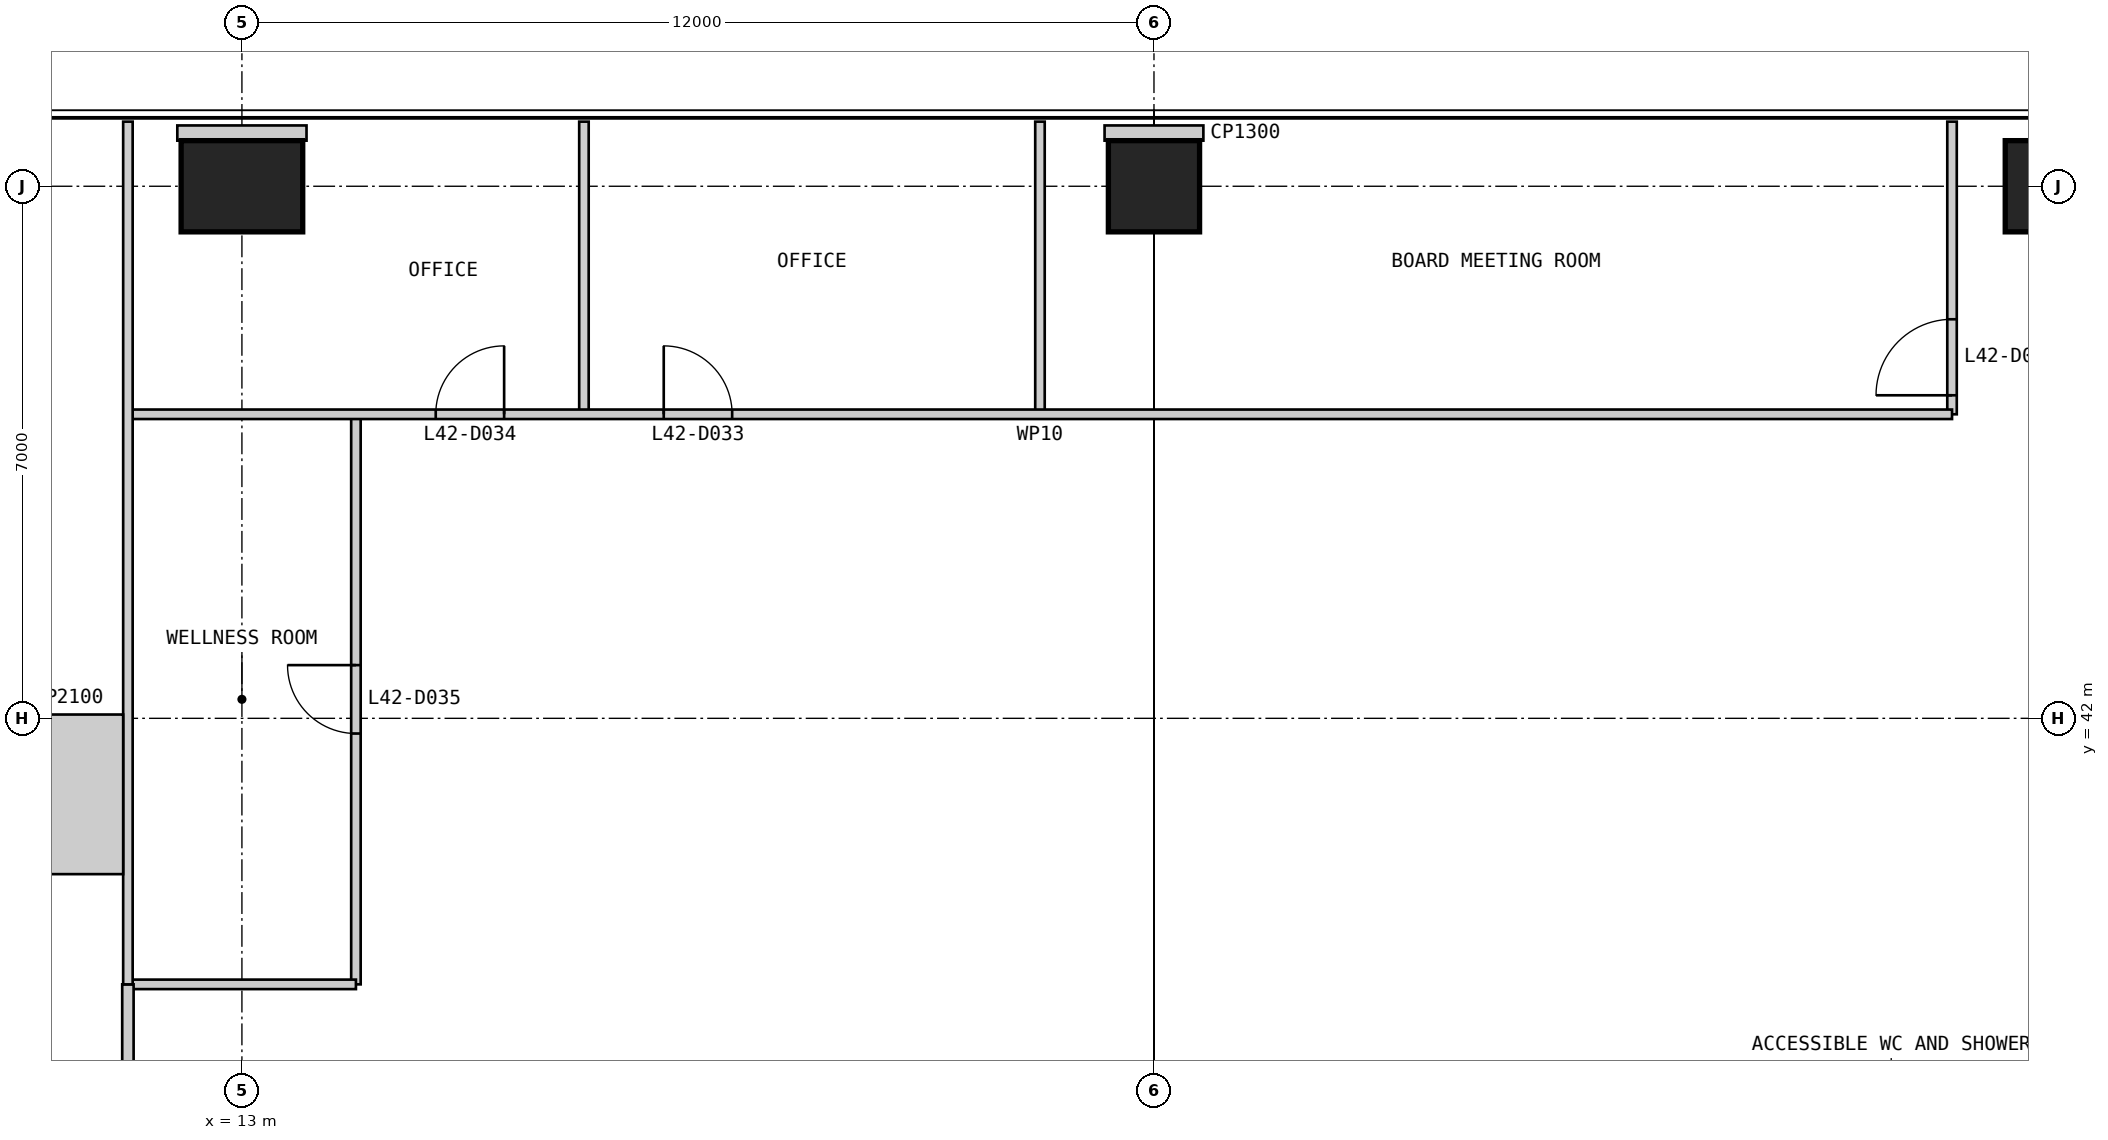
"""IFC4 building model, lengths in metres.
Left out: names, types, materials, properties, quantities, classifications, styles, units other than length and angle.
Written with IfcOpenShell. Run it as: python <this file> out.ifc"""

import sys

from ifc_helpers import new_model, si_unit, direction, frame, frame_2d, origin, origin_2d, place, context, subcontext, project, spatial, rectangle, extrude, element, fill, save


model = new_model("IFC4")
c1 = context("Model", 3, precision=1e-05, world=origin(), true_north=direction((0.0, 1.0)))
c2 = subcontext(c1, "Body", "Model", "MODEL_VIEW")
j1 = project(units=[si_unit("LENGTHUNIT", "METRE"), si_unit("PLANEANGLEUNIT", "RADIAN")], contexts=[c1])
p1 = place(None, origin())
s1 = spatial("IfcSite", under=j1, at=p1, CompositionType="ELEMENT")
p2 = place(p1, origin())
s2 = spatial("IfcBuilding", under=s1, at=p2, CompositionType="ELEMENT")
p3 = place(p2, frame((0.0, 0.0, 181.8)))
s3 = spatial("IfcBuildingStorey", under=s2, at=p3, CompositionType="ELEMENT", Elevation=181.8)
p4 = place(p3, frame((37.0, 49.0, 0.0), z_axis=(0.0, 0.0, 1.0), x_axis=(1.0, 0.0, 0.0)))
e1 = element("IfcColumn", 1, at=p4, inside=s3, PredefinedType="COLUMN", context=c2, shape_type="SweptSolid", body=[
    extrude(rectangle(XDim=1.6, YDim=1.2, at=origin_2d()), origin(), (0.0, 0.0, 1.0), 4.0),
])
p5 = place(p3, frame((25.0, 49.0, 0.0), z_axis=(0.0, 0.0, 1.0), x_axis=(1.0, 0.0, 0.0)))
e2 = element("IfcColumn", 2, at=p5, inside=s3, PredefinedType="COLUMN", context=c2, shape_type="SweptSolid", body=[
    extrude(rectangle(XDim=1.2, YDim=1.2, at=origin_2d()), origin(), (0.0, 0.0, 1.0), 4.0),
])
p6 = place(p3, frame((13.0, 49.0, 0.0), z_axis=(0.0, 0.0, 1.0), x_axis=(1.0, 0.0, 0.0)))
e3 = element("IfcColumn", 3, at=p6, inside=s3, PredefinedType="COLUMN", context=c2, shape_type="SweptSolid", body=[
    extrude(rectangle(XDim=1.6, YDim=1.2, at=origin_2d()), origin(), (0.0, 0.0, 1.0), 4.0),
])
p7 = place(p3, frame((35.5, 49.85, 0.0), z_axis=(0.0, 0.0, 1.0), x_axis=(0.0, -1.0, 0.0)))
e4 = element("IfcWall", 4, at=p7, inside=s3, PredefinedType="PARTITIONING", context=c2, shape_type="SweptSolid", body=[
    extrude(rectangle(XDim=3.85, YDim=0.125, at=frame_2d((1.925, 0.0))), origin(), (0.0, 0.0, 1.0), 3.85),
])
p8 = place(p7, frame((2.6, 0.0, 0.0)))
e5 = element("IfcOpeningElement", 5, at=p8, cuts=e4, PredefinedType="OPENING", context=c2, shape_type="SweptSolid", body=[
    extrude(rectangle(XDim=1.0, YDim=2.2, at=frame_2d((0.5, 1.1))), frame((0.0, 0.073, 0.0), z_axis=(0.0, -1.0, 0.0), x_axis=(1.0, 0.0, 0.0)), (0.0, 0.0, 1.0), 0.145),
])
for number, where, z_axis, x_axis in (
    (6, (23.5, 49.85, 0.0), (0.0, 0.0, 1.0), (0.0, -1.0, 0.0)),
    (7, (17.5, 49.85, 0.0), (0.0, 0.0, 1.0), (0.0, -1.0, 0.0)),
):
    element("IfcWall", number, at=place(p3, frame(where, z_axis=z_axis, x_axis=x_axis)), inside=s3, PredefinedType="PARTITIONING", context=c2, shape_type="SweptSolid", body=[
        extrude(rectangle(XDim=3.85, YDim=0.125, at=frame_2d((1.925, 0.0))), origin(), (0.0, 0.0, 1.0), 3.85),
    ])
p9 = place(p3, frame((14.5, 46.0, 0.0), z_axis=(0.0, 0.0, 1.0), x_axis=(0.0, -1.0, 0.0)))
e8 = element("IfcWall", 8, at=p9, inside=s3, PredefinedType="PARTITIONING", context=c2, shape_type="SweptSolid", body=[
    extrude(rectangle(XDim=7.5, YDim=0.125, at=frame_2d((3.75, 0.0))), origin(), (0.0, 0.0, 1.0), 3.85),
])
p10 = place(p9, frame((3.3, 0.0, 0.0)))
e9 = element("IfcOpeningElement", 9, at=p10, cuts=e8, PredefinedType="OPENING", context=c2, shape_type="SweptSolid", body=[
    extrude(rectangle(XDim=0.9, YDim=2.2, at=frame_2d((0.45, 1.1))), frame((0.0, 0.073, 0.0), z_axis=(0.0, -1.0, 0.0), x_axis=(1.0, 0.0, 0.0)), (0.0, 0.0, 1.0), 0.145),
])
p11 = place(p3, frame((35.5, 46.0, 0.0), z_axis=(0.0, 0.0, 1.0), x_axis=(-1.0, 0.0, 0.0)))
e10 = element("IfcWall", 10, at=p11, inside=s3, PredefinedType="PARTITIONING", context=c2, shape_type="SweptSolid", body=[
    extrude(rectangle(XDim=24.0, YDim=0.125, at=frame_2d((12.0, 0.0))), origin(), (0.0, 0.0, 1.0), 3.85),
])
p12 = place(p11, frame((16.05, 0.0, 0.0)))
e11 = element("IfcOpeningElement", 11, at=p12, cuts=e10, PredefinedType="OPENING", context=c2, shape_type="SweptSolid", body=[
    extrude(rectangle(XDim=0.9, YDim=2.2, at=frame_2d((0.45, 1.1))), frame((0.0, 0.073, 0.0), z_axis=(0.0, -1.0, 0.0), x_axis=(1.0, 0.0, 0.0)), (0.0, 0.0, 1.0), 0.145),
])
p13 = place(p11, frame((19.05, 0.0, 0.0)))
e12 = element("IfcOpeningElement", 12, at=p13, cuts=e10, PredefinedType="OPENING", context=c2, shape_type="SweptSolid", body=[
    extrude(rectangle(XDim=0.9, YDim=2.2, at=frame_2d((0.45, 1.1))), frame((0.0, 0.073, 0.0), z_axis=(0.0, -1.0, 0.0), x_axis=(1.0, 0.0, 0.0)), (0.0, 0.0, 1.0), 0.145),
])
p14 = place(p3, frame((14.5, 38.5, 0.0), z_axis=(0.0, 0.0, 1.0), x_axis=(-1.0, 0.0, 0.0)))
e13 = element("IfcWall", 13, at=p14, inside=s3, PredefinedType="PARTITIONING", context=c2, shape_type="SweptSolid", body=[
    extrude(rectangle(XDim=3.0, YDim=0.125, at=frame_2d((1.5, 0.0))), origin(), (0.0, 0.0, 1.0), 3.85),
])
p15 = place(p3, frame((11.5, 38.5, 0.0), z_axis=(0.0, 0.0, 1.0), x_axis=(0.0, -1.0, 0.0)))
e14 = element("IfcWall", 14, at=p15, inside=s3, PredefinedType="PARTITIONING", context=c2, shape_type="SweptSolid", body=[
    extrude(rectangle(XDim=27.0, YDim=0.15, at=frame_2d((13.5, 0.0))), origin(), (0.0, 0.0, 1.0), 3.85),
])
p16 = place(p15, frame((13.0, 0.0, 0.0)))
e15 = element("IfcOpeningElement", 15, at=p16, cuts=e14, PredefinedType="OPENING", context=c2, shape_type="SweptSolid", body=[
    extrude(rectangle(XDim=1.0, YDim=2.2, at=frame_2d((0.5, 1.1))), frame((0.0, 0.085, 0.0), z_axis=(0.0, -1.0, 0.0), x_axis=(1.0, 0.0, 0.0)), (0.0, 0.0, 1.0), 0.17),
])
p17 = place(p3, frame((11.5, 49.85, 0.0), z_axis=(0.0, 0.0, 1.0), x_axis=(0.0, -1.0, 0.0)))
e16 = element("IfcWall", 16, at=p17, inside=s3, PredefinedType="PARTITIONING", context=c2, shape_type="SweptSolid", body=[
    extrude(rectangle(XDim=11.35, YDim=0.125, at=frame_2d((5.675, 0.0))), origin(), (0.0, 0.0, 1.0), 3.85),
])
p18 = place(p3, frame((25.0, 49.8, 0.0), z_axis=(0.0, 0.0, 1.0), x_axis=(0.0, -1.0, 0.0)))
e17 = element("IfcWall", 17, at=p18, inside=s3, PredefinedType="PARTITIONING", context=c2, shape_type="SweptSolid", body=[
    extrude(rectangle(XDim=0.2, YDim=1.3, at=frame_2d((0.1, 0.0))), origin(), (0.0, 0.0, 1.0), 3.85),
])
p19 = place(p3, frame((13.0, 49.8, 0.0), z_axis=(0.0, 0.0, 1.0), x_axis=(0.0, -1.0, 0.0)))
e18 = element("IfcWall", 18, at=p19, inside=s3, PredefinedType="PARTITIONING", context=c2, shape_type="SweptSolid", body=[
    extrude(rectangle(XDim=0.2, YDim=1.7, at=frame_2d((0.1, 0.0))), origin(), (0.0, 0.0, 1.0), 3.85),
])
p20 = place(p3, frame((11.438, 41.0, 0.0), z_axis=(0.0, 0.0, 1.0), x_axis=(-1.0, 0.0, 0.0)))
e19 = element("IfcWall", 19, at=p20, inside=s3, PredefinedType="PARTITIONING", context=c2, shape_type="SweptSolid", body=[
    extrude(rectangle(XDim=1.438, YDim=2.1, at=frame_2d((0.719, 0.0))), origin(), (0.0, 0.0, 1.0), 3.85),
])
p21 = place(p8, frame((1.0, 0.0, 0.0), z_axis=(0.0, 0.0, 1.0), x_axis=(-1.0, 0.0, 0.0)))
e20 = element("IfcDoor", 20, at=p21, inside=s3, OperationType="SINGLE_SWING_LEFT", PredefinedType="DOOR", context=c2, shape_type="SweptSolid", body=[
    extrude(rectangle(XDim=1.0, YDim=2.2, at=frame_2d((0.5, 1.1))), frame((0.0, 0.025, 0.0), z_axis=(0.0, -1.0, 0.0), x_axis=(1.0, 0.0, 0.0)), (0.0, 0.0, 1.0), 0.05),
])
fill(e5, e20)
p22 = place(p12, frame((0.9, 0.0, 0.0), z_axis=(0.0, 0.0, 1.0), x_axis=(-1.0, 0.0, 0.0)))
e21 = element("IfcDoor", 21, at=p22, inside=s3, OperationType="SINGLE_SWING_LEFT", PredefinedType="DOOR", context=c2, shape_type="SweptSolid", body=[
    extrude(rectangle(XDim=0.9, YDim=2.2, at=frame_2d((0.45, 1.1))), frame((0.0, 0.025, 0.0), z_axis=(0.0, -1.0, 0.0), x_axis=(1.0, 0.0, 0.0)), (0.0, 0.0, 1.0), 0.05),
])
fill(e11, e21)
p23 = place(p13, frame((0.9, 0.0, 0.0), z_axis=(0.0, 0.0, 1.0), x_axis=(-1.0, 0.0, 0.0)))
e22 = element("IfcDoor", 22, at=p23, inside=s3, OperationType="SINGLE_SWING_RIGHT", PredefinedType="DOOR", context=c2, shape_type="SweptSolid", body=[
    extrude(rectangle(XDim=0.9, YDim=2.2, at=frame_2d((0.45, 1.1))), frame((0.0, 0.025, 0.0), z_axis=(0.0, -1.0, 0.0), x_axis=(1.0, 0.0, 0.0)), (0.0, 0.0, 1.0), 0.05),
])
fill(e12, e22)
p24 = place(p10, frame((0.9, 0.0, 0.0), z_axis=(0.0, 0.0, 1.0), x_axis=(-1.0, 0.0, 0.0)))
e23 = element("IfcDoor", 23, at=p24, inside=s3, OperationType="SINGLE_SWING_RIGHT", PredefinedType="DOOR", context=c2, shape_type="SweptSolid", body=[
    extrude(rectangle(XDim=0.9, YDim=2.2, at=frame_2d((0.45, 1.1))), frame((0.0, 0.025, 0.0), z_axis=(0.0, -1.0, 0.0), x_axis=(1.0, 0.0, 0.0)), (0.0, 0.0, 1.0), 0.05),
])
fill(e9, e23)
save(model, sys.argv[1])
